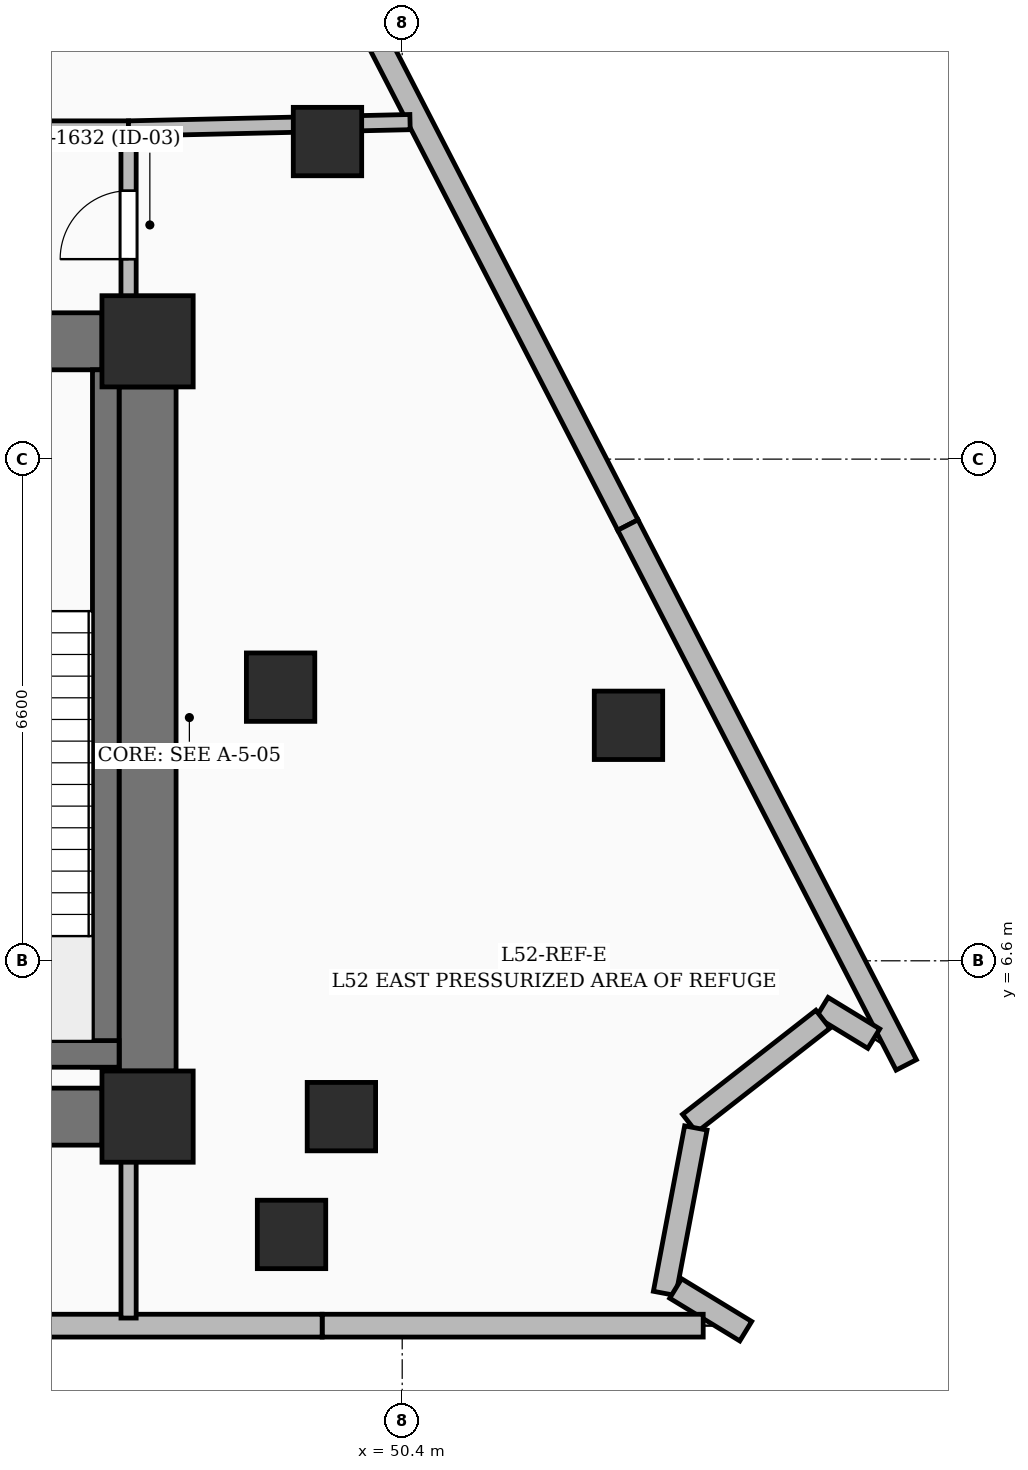
"""IFC4 building model, lengths in metres.
Left out: names, types, materials, properties, quantities, classifications, styles, units other than length and angle.
Written with IfcOpenShell. Run it as: python <this file> out.ifc"""

import sys

from ifc_helpers import new_model, si_unit, direction, frame, frame_2d, origin, origin_2d, place, context, subcontext, project, spatial, rectangle, extrude, element, fill, save


model = new_model("IFC4")
c1 = context("Model", 3, precision=1e-05, world=origin(), true_north=direction((0.0, 1.0)))
c2 = subcontext(c1, "Body", "Model", "MODEL_VIEW")
j1 = project(units=[si_unit("LENGTHUNIT", "METRE"), si_unit("PLANEANGLEUNIT", "RADIAN")], contexts=[c1])
p1 = place(None, origin())
s1 = spatial("IfcSite", under=j1, at=p1, CompositionType="ELEMENT")
p2 = place(p1, origin())
s2 = spatial("IfcBuilding", under=s1, at=p2, CompositionType="ELEMENT")
p3 = place(p2, frame((0.0, 0.0, 201.6)))
s3 = spatial("IfcBuildingStorey", under=s2, at=p3, CompositionType="ELEMENT", Elevation=201.6)
for number, where, z_axis, x_axis in (
    (1, (47.05, 4.55, 0.0), (0.0, 0.0, 1.0), (1.0, 0.0, 0.0)),
    (2, (47.05, 14.75, 0.0), (0.0, 0.0, 1.0), (1.0, 0.0, 0.0)),
):
    element("IfcColumn", number, at=place(p3, frame(where, z_axis=z_axis, x_axis=x_axis)), inside=s3, PredefinedType="COLUMN", context=c2, shape_type="SweptSolid", body=[
        extrude(rectangle(XDim=1.2, YDim=1.2, at=origin_2d()), origin(), (0.0, 0.0, 1.0), 5.4),
    ])
for number, where, z_axis, x_axis in (
    (3, (49.6, 4.55, 0.0), (0.0, 0.0, 1.0), (1.0, 0.0, 0.0)),
    (4, (48.8, 10.2, 0.0), (0.0, 0.0, 1.0), (1.0, 0.0, 0.0)),
):
    element("IfcColumn", number, at=place(p3, frame(where, z_axis=z_axis, x_axis=x_axis)), inside=s3, PredefinedType="COLUMN", context=c2, shape_type="SweptSolid", body=[
        extrude(rectangle(XDim=0.9, YDim=0.9, at=origin_2d()), origin(), (0.0, 0.0, 1.0), 5.4),
    ])
p4 = place(p3, frame((35.75, 4.55, 0.0), z_axis=(0.0, 0.0, 1.0), x_axis=(1.0, 0.0, 0.0)))
e5 = element("IfcWall", 5, at=p4, inside=s3, PredefinedType="SHEAR", context=c2, shape_type="SweptSolid", body=[
    extrude(rectangle(XDim=10.7, YDim=0.75, at=frame_2d((5.35, 0.0))), origin(), (0.0, 0.0, 1.0), 5.4),
])
p5 = place(p3, frame((35.75, 14.75, 0.0), z_axis=(0.0, 0.0, 1.0), x_axis=(1.0, 0.0, 0.0)))
e6 = element("IfcWall", 6, at=p5, inside=s3, PredefinedType="SHEAR", context=c2, shape_type="SweptSolid", body=[
    extrude(rectangle(XDim=10.7, YDim=0.75, at=frame_2d((5.35, 0.0))), origin(), (0.0, 0.0, 1.0), 5.4),
])
p6 = place(p5, frame((1.025, 0.0, 0.0)))
e7 = element("IfcOpeningElement", 7, at=p6, cuts=e6, PredefinedType="OPENING", context=c2, shape_type="SweptSolid", body=[
    extrude(rectangle(XDim=1.05, YDim=2.15, at=frame_2d((0.525, 1.075))), frame((0.0, 0.385, 0.0), z_axis=(0.0, -1.0, 0.0), x_axis=(1.0, 0.0, 0.0)), (0.0, 0.0, 1.0), 0.77),
])
p7 = place(p5, frame((8.625, 0.0, 0.0)))
e8 = element("IfcOpeningElement", 8, at=p7, cuts=e6, PredefinedType="OPENING", context=c2, shape_type="SweptSolid", body=[
    extrude(rectangle(XDim=1.05, YDim=2.15, at=frame_2d((0.525, 1.075))), frame((0.0, 0.385, 0.0), z_axis=(0.0, -1.0, 0.0), x_axis=(1.0, 0.0, 0.0)), (0.0, 0.0, 1.0), 0.77),
])
p8 = place(p3, frame((47.05, 5.15, 0.0), z_axis=(0.0, 0.0, 1.0), x_axis=(0.0, 1.0, 0.0)))
e9 = element("IfcWall", 9, at=p8, inside=s3, PredefinedType="SHEAR", context=c2, shape_type="SweptSolid", body=[
    extrude(rectangle(XDim=9.0, YDim=0.75, at=frame_2d((4.5, 0.0))), origin(), (0.0, 0.0, 1.0), 5.4),
])
p9 = place(p3, frame((46.5, 5.2, 0.0), z_axis=(0.0, 0.0, 1.0), x_axis=(0.0, 1.0, 0.0)))
e10 = element("IfcWall", 10, at=p9, inside=s3, PredefinedType="SOLIDWALL", context=c2, shape_type="SweptSolid", body=[
    extrude(rectangle(XDim=9.175, YDim=0.35, at=frame_2d((4.587, 0.0))), origin(), (0.0, 0.0, 1.0), 5.4),
])
p10 = place(p3, frame((43.125, 5.375, 0.0), z_axis=(0.0, 0.0, 1.0), x_axis=(1.0, 0.0, 0.0)))
e11 = element("IfcWall", 11, at=p10, inside=s3, PredefinedType="SOLIDWALL", context=c2, shape_type="SweptSolid", body=[
    extrude(rectangle(XDim=3.55, YDim=0.35, at=frame_2d((1.775, 0.0))), origin(), (0.0, 0.0, 1.0), 5.4),
])
for number, where, z_axis, x_axis in (
    (12, (48.944, 3.0, 0.0), (0.0, 0.0, 1.0), (1.0, 0.0, 0.0)),
    (13, (53.377, 9.698, 0.0), (0.0, 0.0, 1.0), (1.0, 0.0, 0.0)),
    (14, (49.417, 17.378, 0.0), (0.0, 0.0, 1.0), (1.0, 0.0, 0.0)),
):
    element("IfcColumn", number, at=place(p3, frame(where, z_axis=z_axis, x_axis=x_axis)), inside=s3, PredefinedType="COLUMN", context=c2, shape_type="SweptSolid", body=[
        extrude(rectangle(XDim=0.9, YDim=0.9, at=origin_2d()), origin(), (0.0, 0.0, 1.0), 5.4),
    ])
p11 = place(p3, frame((49.833, 19.191, 0.0), z_axis=(0.0, 0.0, 1.0), x_axis=(0.458291476536, -0.88880195912, 0.0)))
e15 = element("IfcWall", 15, at=p11, inside=s3, PredefinedType="SOLIDWALL", context=c2, shape_type="SweptSolid", body=[
    extrude(rectangle(XDim=7.716, YDim=0.3, at=frame_2d((3.858, 0.0))), origin(), (0.0, 0.0, 1.0), 5.15),
])
p12 = place(p3, frame((53.369, 12.333, 0.0), z_axis=(0.0, 0.0, 1.0), x_axis=(0.45831213698, -0.888791305705, 0.0)))
e16 = element("IfcWall", 16, at=p12, inside=s3, PredefinedType="SOLIDWALL", context=c2, shape_type="SweptSolid", body=[
    extrude(rectangle(XDim=7.991, YDim=0.3, at=frame_2d((3.996, 0.0))), origin(), (0.0, 0.0, 1.0), 5.15),
])
p13 = place(p3, frame((56.604, 5.576, 0.0), z_axis=(0.0, 0.0, 1.0), x_axis=(-0.853729558339, 0.520716661168, 0.0)))
e17 = element("IfcWall", 17, at=p13, inside=s3, PredefinedType="SOLIDWALL", context=c2, shape_type="SweptSolid", body=[
    extrude(rectangle(XDim=0.795, YDim=0.3, at=frame_2d((0.397, 0.0))), origin(), (0.0, 0.0, 1.0), 5.15),
])
p14 = place(p3, frame((55.935, 5.831, 0.0), z_axis=(0.0, 0.0, 1.0), x_axis=(-0.788358616074, -0.61521597221, 0.0)))
e18 = element("IfcWall", 18, at=p14, inside=s3, PredefinedType="SOLIDWALL", context=c2, shape_type="SweptSolid", body=[
    extrude(rectangle(XDim=2.225, YDim=0.3, at=frame_2d((1.113, 0.0))), origin(), (0.0, 0.0, 1.0), 5.15),
])
p15 = place(p3, frame((54.263, 4.401, 0.0), z_axis=(0.0, 0.0, 1.0), x_axis=(-0.185632792315, -0.982619186876, 0.0)))
e19 = element("IfcWall", 19, at=p15, inside=s3, PredefinedType="SOLIDWALL", context=c2, shape_type="SweptSolid", body=[
    extrude(rectangle(XDim=2.215, YDim=0.3, at=frame_2d((1.107, 0.0))), origin(), (0.0, 0.0, 1.0), 5.15),
])
p16 = place(p3, frame((53.998, 2.289, 0.0), z_axis=(0.0, 0.0, 1.0), x_axis=(0.853840299064, -0.520535055203, 0.0)))
e20 = element("IfcWall", 20, at=p16, inside=s3, PredefinedType="SOLIDWALL", context=c2, shape_type="SweptSolid", body=[
    extrude(rectangle(XDim=1.08, YDim=0.3, at=frame_2d((0.54, 0.0))), origin(), (0.0, 0.0, 1.0), 5.15),
])
p17 = place(p3, frame((54.36, 1.8, 0.0), z_axis=(0.0, 0.0, 1.0), x_axis=(-1.0, 0.0, 0.0)))
e21 = element("IfcWall", 21, at=p17, inside=s3, PredefinedType="SOLIDWALL", context=c2, shape_type="SweptSolid", body=[
    extrude(rectangle(XDim=5.013, YDim=0.3, at=frame_2d((2.507, 0.0))), origin(), (0.0, 0.0, 1.0), 5.15),
])
p18 = place(p3, frame((49.347, 1.8, 0.0), z_axis=(0.0, 0.0, 1.0), x_axis=(-1.0, 0.0, 0.0)))
e22 = element("IfcWall", 22, at=p18, inside=s3, PredefinedType="SOLIDWALL", context=c2, shape_type="SweptSolid", body=[
    extrude(rectangle(XDim=5.593, YDim=0.3, at=frame_2d((2.797, 0.0))), origin(), (0.0, 0.0, 1.0), 5.15),
])
p19 = place(p3, frame((46.8, 17.55, 0.0), z_axis=(0.0, 0.0, 1.0), x_axis=(-1.0, 0.0, 0.0)))
e23 = element("IfcWall", 23, at=p19, inside=s3, PredefinedType="PARTITIONING", context=c2, shape_type="SweptSolid", body=[
    extrude(rectangle(XDim=5.15, YDim=0.2, at=frame_2d((2.575, 0.0))), origin(), (0.0, 0.0, 1.0), 4.335),
])
p20 = place(p19, frame((2.115, 0.0, 0.0)))
e24 = element("IfcOpeningElement", 24, at=p20, cuts=e23, PredefinedType="OPENING", context=c2, shape_type="SweptSolid", body=[
    extrude(rectangle(XDim=1.5, YDim=2.2, at=frame_2d((0.75, 1.1))), frame((0.0, 0.11, 0.0), z_axis=(0.0, -1.0, 0.0), x_axis=(1.0, 0.0, 0.0)), (0.0, 0.0, 1.0), 0.22),
])
p21 = place(p3, frame((46.8, 15.125, 0.0), z_axis=(0.0, 0.0, 1.0), x_axis=(0.0, 1.0, 0.0)))
e25 = element("IfcWall", 25, at=p21, inside=s3, PredefinedType="PARTITIONING", context=c2, shape_type="SweptSolid", body=[
    extrude(rectangle(XDim=2.34, YDim=0.2, at=frame_2d((1.17, 0.0))), origin(), (0.0, 0.0, 1.0), 4.335),
])
p22 = place(p21, frame((0.706, 0.0, 0.0)))
e26 = element("IfcOpeningElement", 26, at=p22, cuts=e25, PredefinedType="OPENING", context=c2, shape_type="SweptSolid", body=[
    extrude(rectangle(XDim=0.9, YDim=2.1, at=frame_2d((0.45, 1.05))), frame((0.0, 0.11, 0.0), z_axis=(0.0, -1.0, 0.0), x_axis=(1.0, 0.0, 0.0)), (0.0, 0.0, 1.0), 0.22),
])
p23 = place(p3, frame((46.8, 17.55, 0.0), z_axis=(0.0, 0.0, 1.0), x_axis=(0.99974288939, 0.022674988722, 0.0)))
e27 = element("IfcWall", 27, at=p23, inside=s3, PredefinedType="PARTITIONING", context=c2, shape_type="SweptSolid", body=[
    extrude(rectangle(XDim=3.704, YDim=0.2, at=frame_2d((1.852, 0.0))), origin(), (0.0, 0.0, 1.0), 5.15),
])
p24 = place(p3, frame((46.8, 4.18, 0.0), z_axis=(0.0, 0.0, 1.0), x_axis=(0.0, -1.0, 0.0)))
e28 = element("IfcWall", 28, at=p24, inside=s3, PredefinedType="PARTITIONING", context=c2, shape_type="SweptSolid", body=[
    extrude(rectangle(XDim=2.28, YDim=0.2, at=frame_2d((1.14, 0.0))), origin(), (0.0, 0.0, 1.0), 4.076),
])
p25 = place(p22, origin())
e29 = element("IfcDoor", 29, at=p25, inside=s3, OperationType="SINGLE_SWING_LEFT", PredefinedType="DOOR", context=c2, shape_type="SweptSolid", body=[
    extrude(rectangle(XDim=0.9, YDim=2.1, at=frame_2d((0.45, 1.05))), frame((0.0, 0.025, 0.0), z_axis=(0.0, -1.0, 0.0), x_axis=(1.0, 0.0, 0.0)), (0.0, 0.0, 1.0), 0.05),
])
fill(e26, e29)
save(model, sys.argv[1])
